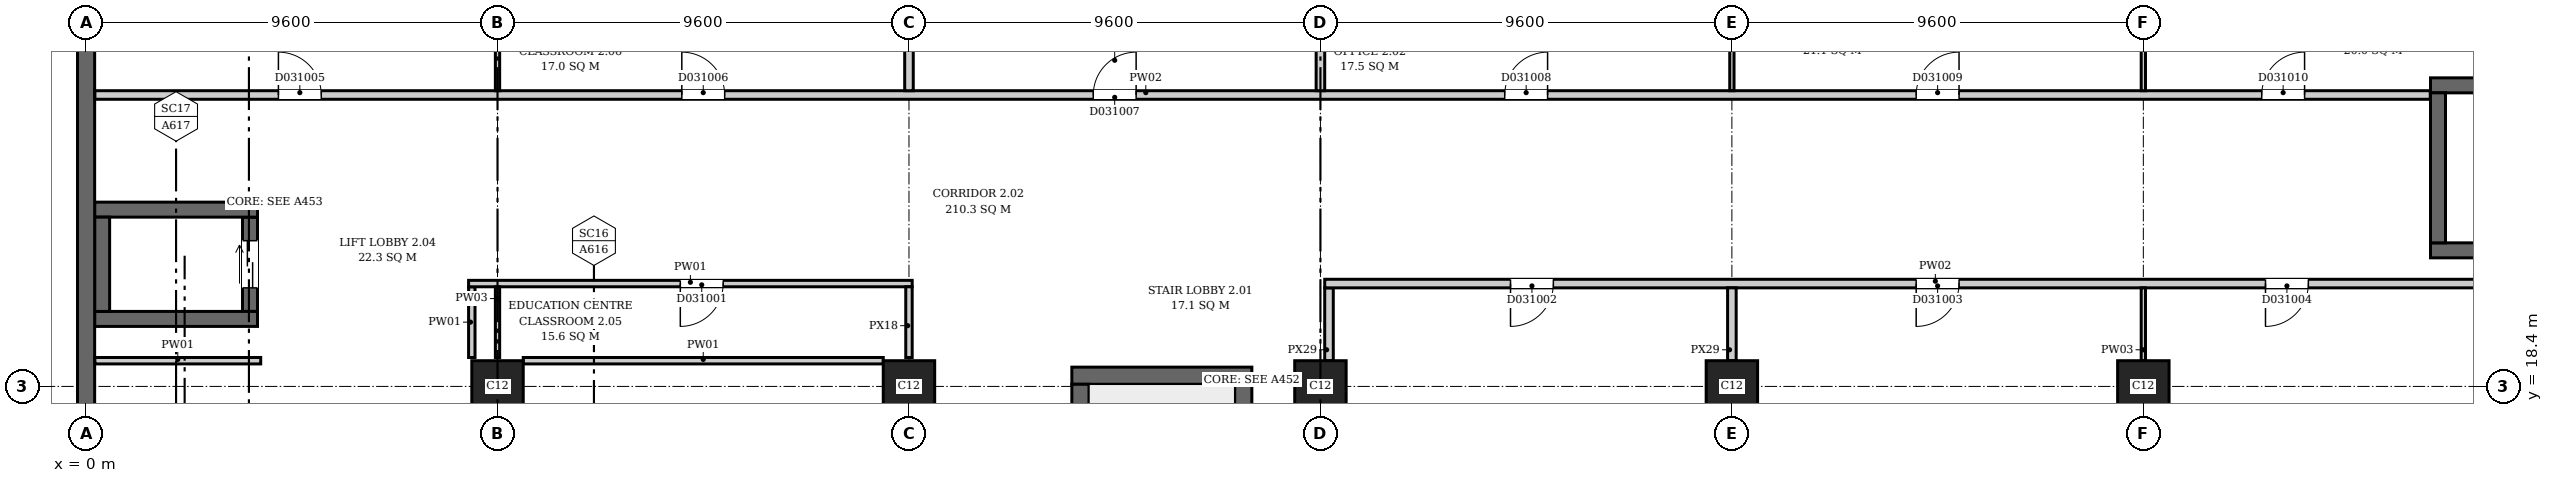
"""IFC4 building model, lengths in metres.
Left out: names, types, materials, properties, quantities, classifications, styles, units other than length and angle.
Written with IfcOpenShell. Run it as: python <this file> out.ifc"""

import sys

from ifc_helpers import new_model, si_unit, direction, frame, frame_2d, origin, origin_2d, place, context, subcontext, project, spatial, rectangle, extrude, element, fill, save


model = new_model("IFC4")
c1 = context("Model", 3, precision=1e-05, world=origin(), true_north=direction((0.0, 1.0)))
c2 = subcontext(c1, "Body", "Model", "MODEL_VIEW")
j1 = project(units=[si_unit("LENGTHUNIT", "METRE"), si_unit("PLANEANGLEUNIT", "RADIAN")], contexts=[c1])
p1 = place(None, origin())
s1 = spatial("IfcSite", under=j1, at=p1, CompositionType="ELEMENT")
p2 = place(p1, origin())
s2 = spatial("IfcBuilding", under=s1, at=p2, CompositionType="ELEMENT")
p3 = place(p2, frame((0.0, 0.0, 14.2)))
s3 = spatial("IfcBuildingStorey", under=s2, at=p3, CompositionType="ELEMENT", Elevation=14.2)
p4 = place(p3, frame((0.0, -0.2, 0.0), z_axis=(0.0, 0.0, 1.0), x_axis=(0.0, 1.0, 0.0)))
e1 = element("IfcWall", 1, at=p4, inside=s3, PredefinedType="SHEAR", context=c2, shape_type="SweptSolid", body=[
    extrude(rectangle(XDim=46.88, YDim=0.4, at=frame_2d((23.44, 0.0))), origin(), (0.0, 0.0, 1.0), 7.5),
])
p5 = place(p3, frame((23.0, 18.65, 0.0), z_axis=(0.0, 0.0, 1.0), x_axis=(1.0, 0.0, 0.0)))
e2 = element("IfcWall", 2, at=p5, inside=s3, PredefinedType="SHEAR", context=c2, shape_type="SweptSolid", body=[
    extrude(rectangle(XDim=4.2, YDim=0.4, at=frame_2d((2.1, 0.0))), origin(), (0.0, 0.0, 1.0), 7.5),
])
for number, where, z_axis, x_axis in (
    (3, (23.2, 11.85, 0.0), (0.0, 0.0, 1.0), (0.0, 1.0, 0.0)),
    (4, (27.0, 11.85, 0.0), (0.0, 0.0, 1.0), (0.0, 1.0, 0.0)),
):
    element("IfcWall", number, at=place(p3, frame(where, z_axis=z_axis, x_axis=x_axis)), inside=s3, PredefinedType="SHEAR", context=c2, shape_type="SweptSolid", body=[
        extrude(rectangle(XDim=6.6, YDim=0.4, at=frame_2d((3.3, 0.0))), origin(), (0.0, 0.0, 1.0), 7.5),
    ])
for number, where, z_axis, x_axis in (
    (5, (0.2, 19.975, 0.0), (0.0, 0.0, 1.0), (1.0, 0.0, 0.0)),
    (6, (0.2, 22.525, 0.0), (0.0, 0.0, 1.0), (1.0, 0.0, 0.0)),
):
    element("IfcWall", number, at=place(p3, frame(where, z_axis=z_axis, x_axis=x_axis)), inside=s3, PredefinedType="SHEAR", context=c2, shape_type="SweptSolid", body=[
        extrude(rectangle(XDim=3.8, YDim=0.35, at=frame_2d((1.9, 0.0))), origin(), (0.0, 0.0, 1.0), 7.5),
    ])
p6 = place(p3, frame((0.375, 20.15, 0.0), z_axis=(0.0, 0.0, 1.0), x_axis=(0.0, 1.0, 0.0)))
e7 = element("IfcWall", 7, at=p6, inside=s3, PredefinedType="SHEAR", context=c2, shape_type="SweptSolid", body=[
    extrude(rectangle(XDim=2.2, YDim=0.35, at=frame_2d((1.1, 0.0))), origin(), (0.0, 0.0, 1.0), 7.5),
])
p7 = place(p3, frame((3.825, 20.15, 0.0), z_axis=(0.0, 0.0, 1.0), x_axis=(0.0, 1.0, 0.0)))
e8 = element("IfcWall", 8, at=p7, inside=s3, PredefinedType="SHEAR", context=c2, shape_type="SweptSolid", body=[
    extrude(rectangle(XDim=2.2, YDim=0.35, at=frame_2d((1.1, 0.0))), origin(), (0.0, 0.0, 1.0), 7.5),
])
p8 = place(p7, frame((0.55, 0.0, 0.0)))
e9 = element("IfcOpeningElement", 9, at=p8, cuts=e8, PredefinedType="OPENING", context=c2, shape_type="SweptSolid", body=[
    extrude(rectangle(XDim=1.1, YDim=2.1, at=frame_2d((0.55, 1.05))), frame((0.0, 0.185, 0.0), z_axis=(0.0, -1.0, 0.0), x_axis=(1.0, 0.0, 0.0)), (0.0, 0.0, 1.0), 0.37),
])
for number, where, z_axis, x_axis in (
    (10, (54.7, 21.575, 0.0), (0.0, 0.0, 1.0), (1.0, 0.0, 0.0)),
    (11, (54.7, 25.425, 0.0), (0.0, 0.0, 1.0), (1.0, 0.0, 0.0)),
):
    element("IfcWall", number, at=place(p3, frame(where, z_axis=z_axis, x_axis=x_axis)), inside=s3, PredefinedType="SHEAR", context=c2, shape_type="SweptSolid", body=[
        extrude(rectangle(XDim=2.7, YDim=0.35, at=frame_2d((1.35, 0.0))), origin(), (0.0, 0.0, 1.0), 7.5),
    ])
p9 = place(p3, frame((54.875, 21.75, 0.0), z_axis=(0.0, 0.0, 1.0), x_axis=(0.0, 1.0, 0.0)))
e12 = element("IfcWall", 12, at=p9, inside=s3, PredefinedType="SHEAR", context=c2, shape_type="SweptSolid", body=[
    extrude(rectangle(XDim=3.5, YDim=0.35, at=frame_2d((1.75, 0.0))), origin(), (0.0, 0.0, 1.0), 7.5),
])
for number, where, z_axis, x_axis in (
    (13, (9.6, 18.4, 0.0), (0.0, 0.0, 1.0), (1.0, 0.0, 0.0)),
    (14, (19.2, 18.4, 0.0), (0.0, 0.0, 1.0), (1.0, 0.0, 0.0)),
    (15, (28.8, 18.4, 0.0), (0.0, 0.0, 1.0), (1.0, 0.0, 0.0)),
    (16, (38.4, 18.4, 0.0), (0.0, 0.0, 1.0), (1.0, 0.0, 0.0)),
    (17, (48.0, 18.4, 0.0), (0.0, 0.0, 1.0), (1.0, 0.0, 0.0)),
):
    element("IfcColumn", number, at=place(p3, frame(where, z_axis=z_axis, x_axis=x_axis)), inside=s3, PredefinedType="COLUMN", context=c2, shape_type="SweptSolid", body=[
        extrude(rectangle(XDim=1.2, YDim=1.2, at=origin_2d()), origin(), (0.0, 0.0, 1.0), 7.5),
    ])
p10 = place(p3, frame((0.206, 19.0, 0.0), z_axis=(0.0, 0.0, 1.0), x_axis=(1.0, 0.0, 0.0)))
e18 = element("IfcWall", 18, at=p10, inside=s3, PredefinedType="PARTITIONING", context=c2, shape_type="SweptSolid", body=[
    extrude(rectangle(XDim=3.869, YDim=0.15, at=frame_2d((1.935, 0.0))), origin(), (0.0, 0.0, 1.0), 7.15),
])
p11 = place(p3, frame((0.206, 25.2, 0.0), z_axis=(0.0, 0.0, 1.0), x_axis=(1.0, 0.0, 0.0)))
e19 = element("IfcWall", 19, at=p11, inside=s3, PredefinedType="PARTITIONING", context=c2, shape_type="SweptSolid", body=[
    extrude(rectangle(XDim=54.488, YDim=0.2, at=frame_2d((27.244, 0.0))), origin(), (0.0, 0.0, 1.0), 7.15),
])
p12 = place(p11, frame((4.282, 0.0, 0.0)))
e20 = element("IfcOpeningElement", 20, at=p12, cuts=e19, PredefinedType="OPENING", context=c2, shape_type="SweptSolid", body=[
    extrude(rectangle(XDim=1.0, YDim=2.1, at=frame_2d((0.5, 1.05))), frame((0.0, 0.11, 0.0), z_axis=(0.0, -1.0, 0.0), x_axis=(1.0, 0.0, 0.0)), (0.0, 0.0, 1.0), 0.22),
])
p13 = place(p11, frame((13.694, 0.0, 0.0)))
e21 = element("IfcOpeningElement", 21, at=p13, cuts=e19, PredefinedType="OPENING", context=c2, shape_type="SweptSolid", body=[
    extrude(rectangle(XDim=1.0, YDim=2.1, at=frame_2d((0.5, 1.05))), frame((0.0, 0.11, 0.0), z_axis=(0.0, -1.0, 0.0), x_axis=(1.0, 0.0, 0.0)), (0.0, 0.0, 1.0), 0.22),
])
p14 = place(p11, frame((23.294, 0.0, 0.0)))
e22 = element("IfcOpeningElement", 22, at=p14, cuts=e19, PredefinedType="OPENING", context=c2, shape_type="SweptSolid", body=[
    extrude(rectangle(XDim=1.0, YDim=2.1, at=frame_2d((0.5, 1.05))), frame((0.0, 0.11, 0.0), z_axis=(0.0, -1.0, 0.0), x_axis=(1.0, 0.0, 0.0)), (0.0, 0.0, 1.0), 0.22),
])
p15 = place(p11, frame((32.894, 0.0, 0.0)))
e23 = element("IfcOpeningElement", 23, at=p15, cuts=e19, PredefinedType="OPENING", context=c2, shape_type="SweptSolid", body=[
    extrude(rectangle(XDim=1.0, YDim=2.1, at=frame_2d((0.5, 1.05))), frame((0.0, 0.11, 0.0), z_axis=(0.0, -1.0, 0.0), x_axis=(1.0, 0.0, 0.0)), (0.0, 0.0, 1.0), 0.22),
])
p16 = place(p11, frame((42.494, 0.0, 0.0)))
e24 = element("IfcOpeningElement", 24, at=p16, cuts=e19, PredefinedType="OPENING", context=c2, shape_type="SweptSolid", body=[
    extrude(rectangle(XDim=1.0, YDim=2.1, at=frame_2d((0.5, 1.05))), frame((0.0, 0.11, 0.0), z_axis=(0.0, -1.0, 0.0), x_axis=(1.0, 0.0, 0.0)), (0.0, 0.0, 1.0), 0.22),
])
p17 = place(p11, frame((50.556, 0.0, 0.0)))
e25 = element("IfcOpeningElement", 25, at=p17, cuts=e19, PredefinedType="OPENING", context=c2, shape_type="SweptSolid", body=[
    extrude(rectangle(XDim=1.0, YDim=2.1, at=frame_2d((0.5, 1.05))), frame((0.0, 0.11, 0.0), z_axis=(0.0, -1.0, 0.0), x_axis=(1.0, 0.0, 0.0)), (0.0, 0.0, 1.0), 0.22),
])
p18 = place(p3, frame((9.0, 19.075, 0.0), z_axis=(0.0, 0.0, 1.0), x_axis=(0.0, 1.0, 0.0)))
e26 = element("IfcWall", 26, at=p18, inside=s3, PredefinedType="PARTITIONING", context=c2, shape_type="SweptSolid", body=[
    extrude(rectangle(XDim=1.65, YDim=0.15, at=frame_2d((0.825, 0.0))), origin(), (0.0, 0.0, 1.0), 7.15),
])
p19 = place(p3, frame((8.925, 20.8, 0.0), z_axis=(0.0, 0.0, 1.0), x_axis=(1.0, 0.0, 0.0)))
e27 = element("IfcWall", 27, at=p19, inside=s3, PredefinedType="PARTITIONING", context=c2, shape_type="SweptSolid", body=[
    extrude(rectangle(XDim=10.35, YDim=0.15, at=frame_2d((5.175, 0.0))), origin(), (0.0, 0.0, 1.0), 7.15),
])
p20 = place(p19, frame((4.94, 0.0, 0.0)))
e28 = element("IfcOpeningElement", 28, at=p20, cuts=e27, PredefinedType="OPENING", context=c2, shape_type="SweptSolid", body=[
    extrude(rectangle(XDim=1.0, YDim=2.1, at=frame_2d((0.5, 1.05))), frame((0.0, 0.085, 0.0), z_axis=(0.0, -1.0, 0.0), x_axis=(1.0, 0.0, 0.0)), (0.0, 0.0, 1.0), 0.17),
])
p21 = place(p3, frame((9.6, 19.075, 0.0), z_axis=(0.0, 0.0, 1.0), x_axis=(0.0, 1.0, 0.0)))
e29 = element("IfcWall", 29, at=p21, inside=s3, PredefinedType="PARTITIONING", context=c2, shape_type="SweptSolid", body=[
    extrude(rectangle(XDim=1.65, YDim=0.1, at=frame_2d((0.825, 0.0))), origin(), (0.0, 0.0, 1.0), 6.75),
])
p22 = place(p3, frame((9.6, 25.3, 0.0), z_axis=(0.0, 0.0, 1.0), x_axis=(0.0, 1.0, 0.0)))
e30 = element("IfcWall", 30, at=p22, inside=s3, PredefinedType="PARTITIONING", context=c2, shape_type="SweptSolid", body=[
    extrude(rectangle(XDim=1.7, YDim=0.1, at=frame_2d((0.85, 0.0))), origin(), (0.0, 0.0, 1.0), 6.75),
])
p23 = place(p3, frame((10.2, 19.0, 0.0), z_axis=(0.0, 0.0, 1.0), x_axis=(1.0, 0.0, 0.0)))
e31 = element("IfcWall", 31, at=p23, inside=s3, PredefinedType="PARTITIONING", context=c2, shape_type="SweptSolid", body=[
    extrude(rectangle(XDim=8.4, YDim=0.15, at=frame_2d((4.2, 0.0))), origin(), (0.0, 0.0, 1.0), 7.15),
])
p24 = place(p3, frame((19.2, 25.3, 0.0), z_axis=(0.0, 0.0, 1.0), x_axis=(0.0, 1.0, 0.0)))
e32 = element("IfcWall", 32, at=p24, inside=s3, PredefinedType="PARTITIONING", context=c2, shape_type="SweptSolid", body=[
    extrude(rectangle(XDim=1.7, YDim=0.2, at=frame_2d((0.85, 0.0))), origin(), (0.0, 0.0, 1.0), 6.75),
])
p25 = place(p3, frame((19.2, 19.075, 0.0), z_axis=(0.0, 0.0, 1.0), x_axis=(0.0, 1.0, 0.0)))
e33 = element("IfcWall", 33, at=p25, inside=s3, PredefinedType="PARTITIONING", context=c2, shape_type="SweptSolid", body=[
    extrude(rectangle(XDim=1.65, YDim=0.15, at=frame_2d((0.825, 0.0))), origin(), (0.0, 0.0, 1.0), 6.75),
])
for number, where, z_axis, x_axis in (
    (34, (28.8, 25.3, 0.0), (0.0, 0.0, 1.0), (0.0, 1.0, 0.0)),
    (35, (29.0, 19.0, 0.0), (0.0, 0.0, 1.0), (0.0, 1.0, 0.0)),
):
    element("IfcWall", number, at=place(p3, frame(where, z_axis=z_axis, x_axis=x_axis)), inside=s3, PredefinedType="PARTITIONING", context=c2, shape_type="SweptSolid", body=[
        extrude(rectangle(XDim=1.7, YDim=0.2, at=frame_2d((0.85, 0.0))), origin(), (0.0, 0.0, 1.0), 6.75),
    ])
p26 = place(p3, frame((28.9, 20.8, 0.0), z_axis=(0.0, 0.0, 1.0), x_axis=(1.0, 0.0, 0.0)))
e36 = element("IfcWall", 36, at=p26, inside=s3, PredefinedType="PARTITIONING", context=c2, shape_type="SweptSolid", body=[
    extrude(rectangle(XDim=28.494, YDim=0.2, at=frame_2d((14.247, 0.0))), origin(), (0.0, 0.0, 1.0), 7.15),
])
p27 = place(p26, frame((4.335, 0.0, 0.0)))
e37 = element("IfcOpeningElement", 37, at=p27, cuts=e36, PredefinedType="OPENING", context=c2, shape_type="SweptSolid", body=[
    extrude(rectangle(XDim=1.0, YDim=2.1, at=frame_2d((0.5, 1.05))), frame((0.0, 0.11, 0.0), z_axis=(0.0, -1.0, 0.0), x_axis=(1.0, 0.0, 0.0)), (0.0, 0.0, 1.0), 0.22),
])
p28 = place(p26, frame((13.8, 0.0, 0.0)))
e38 = element("IfcOpeningElement", 38, at=p28, cuts=e36, PredefinedType="OPENING", context=c2, shape_type="SweptSolid", body=[
    extrude(rectangle(XDim=1.0, YDim=2.1, at=frame_2d((0.5, 1.05))), frame((0.0, 0.11, 0.0), z_axis=(0.0, -1.0, 0.0), x_axis=(1.0, 0.0, 0.0)), (0.0, 0.0, 1.0), 0.22),
])
p29 = place(p26, frame((21.95, 0.0, 0.0)))
e39 = element("IfcOpeningElement", 39, at=p29, cuts=e36, PredefinedType="OPENING", context=c2, shape_type="SweptSolid", body=[
    extrude(rectangle(XDim=1.0, YDim=2.1, at=frame_2d((0.5, 1.05))), frame((0.0, 0.11, 0.0), z_axis=(0.0, -1.0, 0.0), x_axis=(1.0, 0.0, 0.0)), (0.0, 0.0, 1.0), 0.22),
])
p30 = place(p3, frame((38.4, 19.0, 0.0), z_axis=(0.0, 0.0, 1.0), x_axis=(0.0, 1.0, 0.0)))
e40 = element("IfcWall", 40, at=p30, inside=s3, PredefinedType="PARTITIONING", context=c2, shape_type="SweptSolid", body=[
    extrude(rectangle(XDim=1.7, YDim=0.2, at=frame_2d((0.85, 0.0))), origin(), (0.0, 0.0, 1.0), 6.75),
])
for number, where, z_axis, x_axis in (
    (41, (38.4, 25.3, 0.0), (0.0, 0.0, 1.0), (0.0, 1.0, 0.0)),
    (42, (48.0, 19.0, 0.0), (0.0, 0.0, 1.0), (0.0, 1.0, 0.0)),
    (43, (48.0, 25.3, 0.0), (0.0, 0.0, 1.0), (0.0, 1.0, 0.0)),
):
    element("IfcWall", number, at=place(p3, frame(where, z_axis=z_axis, x_axis=x_axis)), inside=s3, PredefinedType="PARTITIONING", context=c2, shape_type="SweptSolid", body=[
        extrude(rectangle(XDim=1.7, YDim=0.1, at=frame_2d((0.85, 0.0))), origin(), (0.0, 0.0, 1.0), 6.75),
    ])
p31 = place(p8, origin())
e44 = element("IfcDoor", 44, at=p31, inside=s3, OperationType="DOUBLE_DOOR_SLIDING", PredefinedType="DOOR", context=c2, shape_type="SweptSolid", body=[
    extrude(rectangle(XDim=1.1, YDim=2.1, at=frame_2d((0.55, 1.05))), frame((0.0, 0.025, 0.0), z_axis=(0.0, -1.0, 0.0), x_axis=(1.0, 0.0, 0.0)), (0.0, 0.0, 1.0), 0.05),
])
fill(e9, e44)
p32 = place(p20, origin())
e45 = element("IfcDoor", 45, at=p32, inside=s3, OperationType="SINGLE_SWING_LEFT", PredefinedType="DOOR", context=c2, shape_type="SweptSolid", body=[
    extrude(rectangle(XDim=1.0, YDim=2.1, at=frame_2d((0.5, 1.05))), frame((0.0, 0.025, 0.0), z_axis=(0.0, -1.0, 0.0), x_axis=(1.0, 0.0, 0.0)), (0.0, 0.0, 1.0), 0.05),
])
fill(e28, e45)
p33 = place(p27, origin())
e46 = element("IfcDoor", 46, at=p33, inside=s3, OperationType="SINGLE_SWING_LEFT", PredefinedType="DOOR", context=c2, shape_type="SweptSolid", body=[
    extrude(rectangle(XDim=1.0, YDim=2.1, at=frame_2d((0.5, 1.05))), frame((0.0, 0.025, 0.0), z_axis=(0.0, -1.0, 0.0), x_axis=(1.0, 0.0, 0.0)), (0.0, 0.0, 1.0), 0.05),
])
fill(e37, e46)
p34 = place(p28, origin())
e47 = element("IfcDoor", 47, at=p34, inside=s3, OperationType="SINGLE_SWING_LEFT", PredefinedType="DOOR", context=c2, shape_type="SweptSolid", body=[
    extrude(rectangle(XDim=1.0, YDim=2.1, at=frame_2d((0.5, 1.05))), frame((0.0, 0.025, 0.0), z_axis=(0.0, -1.0, 0.0), x_axis=(1.0, 0.0, 0.0)), (0.0, 0.0, 1.0), 0.05),
])
fill(e38, e47)
p35 = place(p29, origin())
e48 = element("IfcDoor", 48, at=p35, inside=s3, OperationType="SINGLE_SWING_LEFT", PredefinedType="DOOR", context=c2, shape_type="SweptSolid", body=[
    extrude(rectangle(XDim=1.0, YDim=2.1, at=frame_2d((0.5, 1.05))), frame((0.0, 0.025, 0.0), z_axis=(0.0, -1.0, 0.0), x_axis=(1.0, 0.0, 0.0)), (0.0, 0.0, 1.0), 0.05),
])
fill(e39, e48)
p36 = place(p12, origin())
e49 = element("IfcDoor", 49, at=p36, inside=s3, OperationType="SINGLE_SWING_LEFT", PredefinedType="DOOR", context=c2, shape_type="SweptSolid", body=[
    extrude(rectangle(XDim=1.0, YDim=2.1, at=frame_2d((0.5, 1.05))), frame((0.0, 0.025, 0.0), z_axis=(0.0, -1.0, 0.0), x_axis=(1.0, 0.0, 0.0)), (0.0, 0.0, 1.0), 0.05),
])
fill(e20, e49)
p37 = place(p13, origin())
e50 = element("IfcDoor", 50, at=p37, inside=s3, OperationType="SINGLE_SWING_LEFT", PredefinedType="DOOR", context=c2, shape_type="SweptSolid", body=[
    extrude(rectangle(XDim=1.0, YDim=2.1, at=frame_2d((0.5, 1.05))), frame((0.0, 0.025, 0.0), z_axis=(0.0, -1.0, 0.0), x_axis=(1.0, 0.0, 0.0)), (0.0, 0.0, 1.0), 0.05),
])
fill(e21, e50)
p38 = place(p14, origin())
e51 = element("IfcDoor", 51, at=p38, inside=s3, OperationType="SINGLE_SWING_RIGHT", PredefinedType="DOOR", context=c2, shape_type="SweptSolid", body=[
    extrude(rectangle(XDim=1.0, YDim=2.1, at=frame_2d((0.5, 1.05))), frame((0.0, 0.025, 0.0), z_axis=(0.0, -1.0, 0.0), x_axis=(1.0, 0.0, 0.0)), (0.0, 0.0, 1.0), 0.05),
])
fill(e22, e51)
p39 = place(p15, origin())
e52 = element("IfcDoor", 52, at=p39, inside=s3, OperationType="SINGLE_SWING_RIGHT", PredefinedType="DOOR", context=c2, shape_type="SweptSolid", body=[
    extrude(rectangle(XDim=1.0, YDim=2.1, at=frame_2d((0.5, 1.05))), frame((0.0, 0.025, 0.0), z_axis=(0.0, -1.0, 0.0), x_axis=(1.0, 0.0, 0.0)), (0.0, 0.0, 1.0), 0.05),
])
fill(e23, e52)
p40 = place(p16, origin())
e53 = element("IfcDoor", 53, at=p40, inside=s3, OperationType="SINGLE_SWING_RIGHT", PredefinedType="DOOR", context=c2, shape_type="SweptSolid", body=[
    extrude(rectangle(XDim=1.0, YDim=2.1, at=frame_2d((0.5, 1.05))), frame((0.0, 0.025, 0.0), z_axis=(0.0, -1.0, 0.0), x_axis=(1.0, 0.0, 0.0)), (0.0, 0.0, 1.0), 0.05),
])
fill(e24, e53)
p41 = place(p17, origin())
e54 = element("IfcDoor", 54, at=p41, inside=s3, OperationType="SINGLE_SWING_RIGHT", PredefinedType="DOOR", context=c2, shape_type="SweptSolid", body=[
    extrude(rectangle(XDim=1.0, YDim=2.1, at=frame_2d((0.5, 1.05))), frame((0.0, 0.025, 0.0), z_axis=(0.0, -1.0, 0.0), x_axis=(1.0, 0.0, 0.0)), (0.0, 0.0, 1.0), 0.05),
])
fill(e25, e54)
save(model, sys.argv[1])
